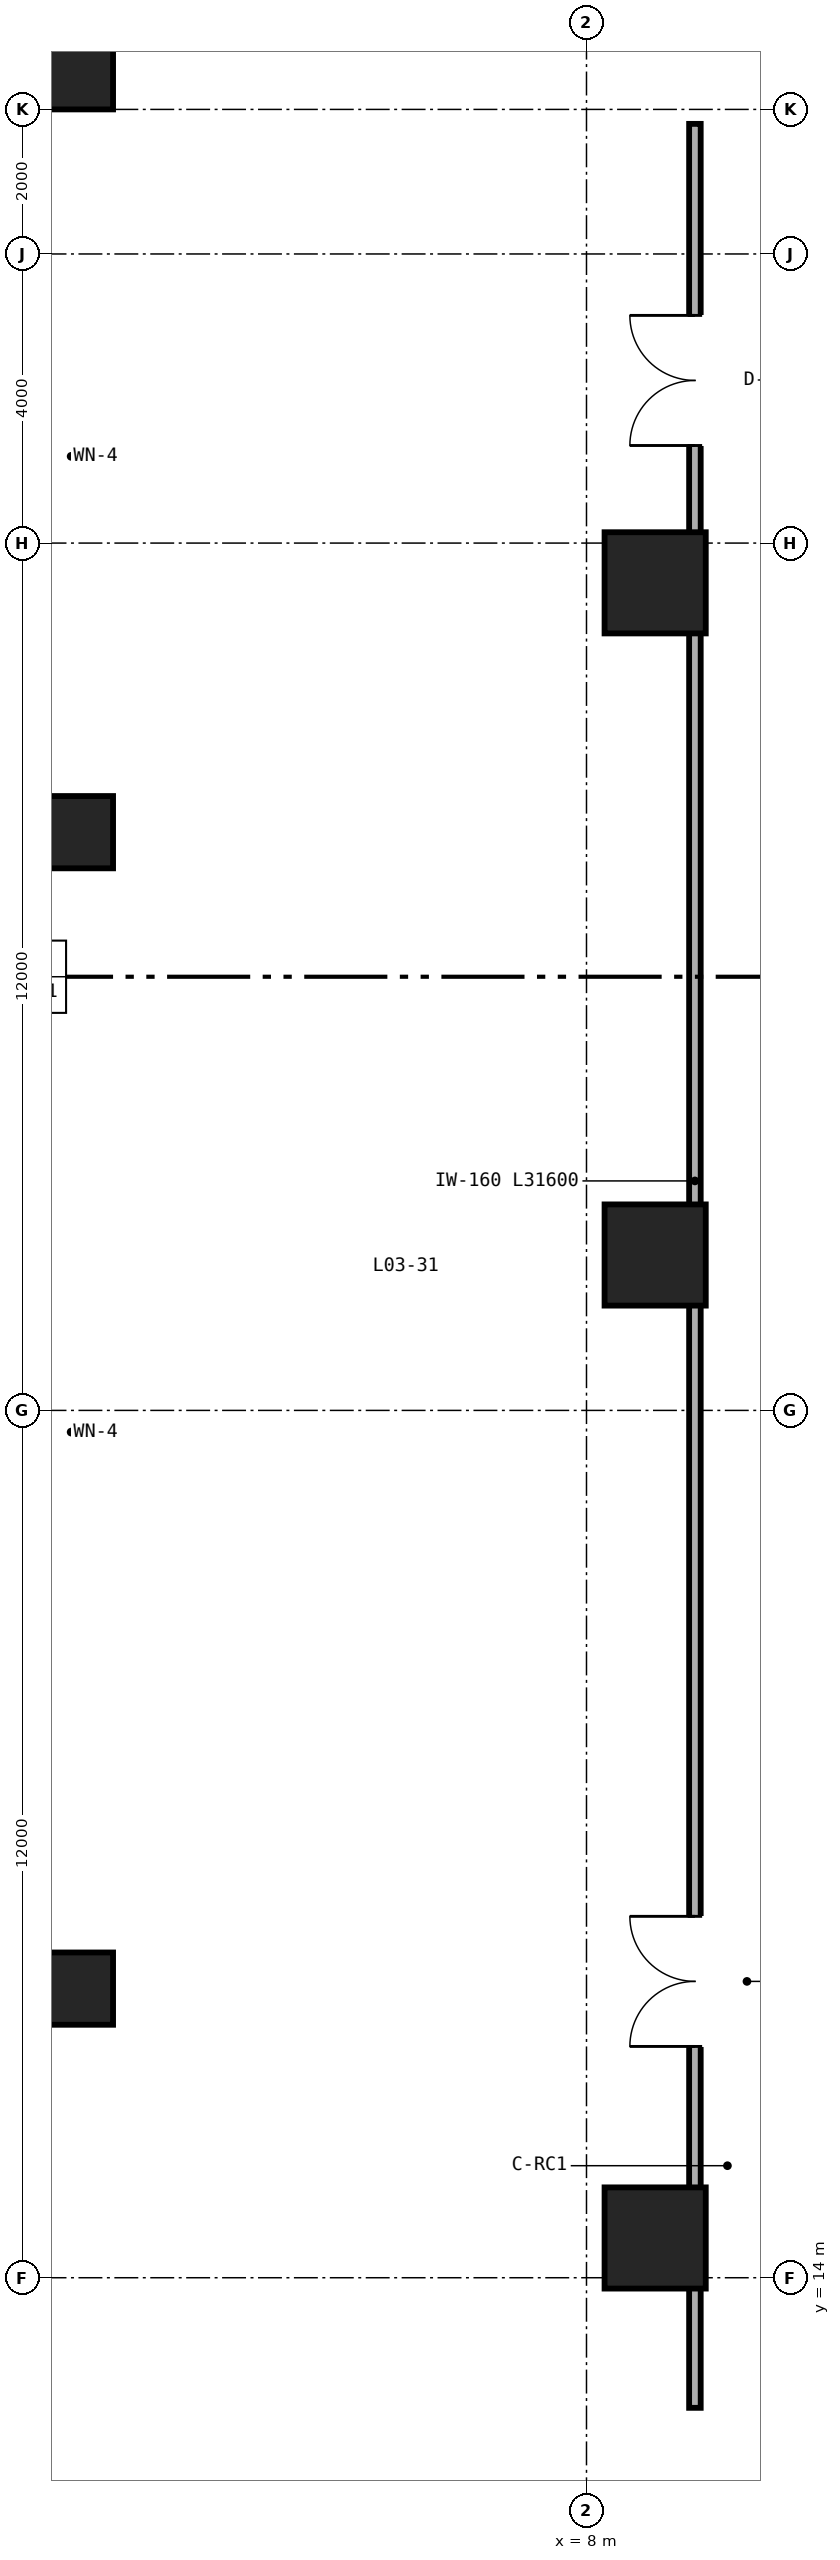
"""IFC4 building model, lengths in metres.
Left out: names, types, materials, properties, quantities, classifications, styles, units other than length and angle.
Written with IfcOpenShell. Run it as: python <this file> out.ifc"""

import sys

from ifc_helpers import new_model, si_unit, direction, frame, frame_2d, origin, origin_2d, place, context, subcontext, project, spatial, rectangle, extrude, source, transform, mapped, element, fill, save


model = new_model("IFC4")
c1 = context("Model", 3, precision=1e-05, world=origin(), true_north=direction((0.0, 1.0)))
c2 = subcontext(c1, "Body", "Model", "MODEL_VIEW")
j1 = project(units=[si_unit("LENGTHUNIT", "METRE"), si_unit("PLANEANGLEUNIT", "RADIAN")], contexts=[c1])
p1 = place(None, origin())
s1 = spatial("IfcSite", under=j1, at=p1, CompositionType="ELEMENT")
p2 = place(p1, origin())
s2 = spatial("IfcBuilding", under=s1, at=p2, CompositionType="ELEMENT")
p3 = place(p2, frame((0.0, 0.0, 11.4)))
s3 = spatial("IfcBuildingStorey", under=s2, at=p3, CompositionType="ELEMENT", Elevation=11.4)
m1 = source(origin(), c2, "Body", "SweptSolid", [
    extrude(rectangle(XDim=1.0, YDim=1.0, at=origin_2d()), origin(), (0.0, 0.0, 1.0), 7.51),
])
for number, where, z_axis, x_axis in (
    (1, (0.95, 18.0, 0.0), (0.0, 0.0, 1.0), (1.0, 0.0, 0.0)),
    (2, (0.95, 34.0, 0.0), (0.0, 0.0, 1.0), (1.0, 0.0, 0.0)),
    (3, (0.95, 44.5, 0.0), (0.0, 0.0, 1.0), (1.0, 0.0, 0.0)),
):
    element("IfcColumn", number, at=place(p3, frame(where, z_axis=z_axis, x_axis=x_axis)), inside=s3, PredefinedType="COLUMN", context=c2, shape_type="MappedRepresentation", body=[
        mapped(m1, transform((0.0, 0.0, 0.0), scale=1.0)),
    ])
m2 = source(origin(), c2, "Body", "SweptSolid", [
    extrude(rectangle(XDim=1.4, YDim=1.4, at=origin_2d()), origin(), (0.0, 0.0, 1.0), 7.51),
])
for number, where, z_axis, x_axis in (
    (4, (8.95, 14.55, 0.0), (0.0, 0.0, 1.0), (1.0, 0.0, 0.0)),
    (5, (8.95, 28.15, 0.0), (0.0, 0.0, 1.0), (1.0, 0.0, 0.0)),
    (6, (8.95, 37.45, 0.0), (0.0, 0.0, 1.0), (1.0, 0.0, 0.0)),
):
    element("IfcColumn", number, at=place(p3, frame(where, z_axis=z_axis, x_axis=x_axis)), inside=s3, PredefinedType="COLUMN", context=c2, shape_type="MappedRepresentation", body=[
        mapped(m2, transform((0.0, 0.0, 0.0), scale=1.0)),
    ])
p4 = place(p3, frame((9.5, 12.2, 0.0), z_axis=(0.0, 0.0, 1.0), x_axis=(0.0, 1.0, 0.0)))
e7 = element("IfcWall", 7, at=p4, inside=s3, PredefinedType="PARTITIONING", context=c2, shape_type="SweptSolid", body=[
    extrude(rectangle(XDim=31.6, YDim=0.16, at=frame_2d((15.8, 0.0))), origin(), (0.0, 0.0, 1.0), 6.583),
])
p5 = place(p4, frame((5.0, 0.0, 0.0)))
e8 = element("IfcOpeningElement", 8, at=p5, cuts=e7, PredefinedType="OPENING", context=c2, shape_type="SweptSolid", body=[
    extrude(rectangle(XDim=1.8, YDim=2.35, at=frame_2d((0.9, 1.175))), frame((0.0, 0.09, 0.0), z_axis=(0.0, -1.0, 0.0), x_axis=(1.0, 0.0, 0.0)), (0.0, 0.0, 1.0), 0.18),
])
p6 = place(p4, frame((27.15, 0.0, 0.0)))
e9 = element("IfcOpeningElement", 9, at=p6, cuts=e7, PredefinedType="OPENING", context=c2, shape_type="SweptSolid", body=[
    extrude(rectangle(XDim=1.8, YDim=2.35, at=frame_2d((0.9, 1.175))), frame((0.0, 0.09, 0.0), z_axis=(0.0, -1.0, 0.0), x_axis=(1.0, 0.0, 0.0)), (0.0, 0.0, 1.0), 0.18),
])
m3 = source(origin(), c2, "Body", "SweptSolid", [
    extrude(rectangle(XDim=1.8, YDim=2.35, at=frame_2d((0.9, 1.175))), frame((0.0, 0.025, 0.0), z_axis=(0.0, -1.0, 0.0), x_axis=(1.0, 0.0, 0.0)), (0.0, 0.0, 1.0), 0.05),
])
p7 = place(p5, origin())
e10 = element("IfcDoor", 10, at=p7, inside=s3, OperationType="DOUBLE_DOOR_SINGLE_SWING", PredefinedType="DOOR", context=c2, shape_type="MappedRepresentation", body=[
    mapped(m3, transform((0.0, 0.0, 0.0), scale=1.0)),
])
fill(e8, e10)
p8 = place(p6, origin())
e11 = element("IfcDoor", 11, at=p8, inside=s3, OperationType="DOUBLE_DOOR_SINGLE_SWING", PredefinedType="DOOR", context=c2, shape_type="MappedRepresentation", body=[
    mapped(m3, transform((0.0, 0.0, 0.0), scale=1.0)),
])
fill(e9, e11)
save(model, sys.argv[1])
